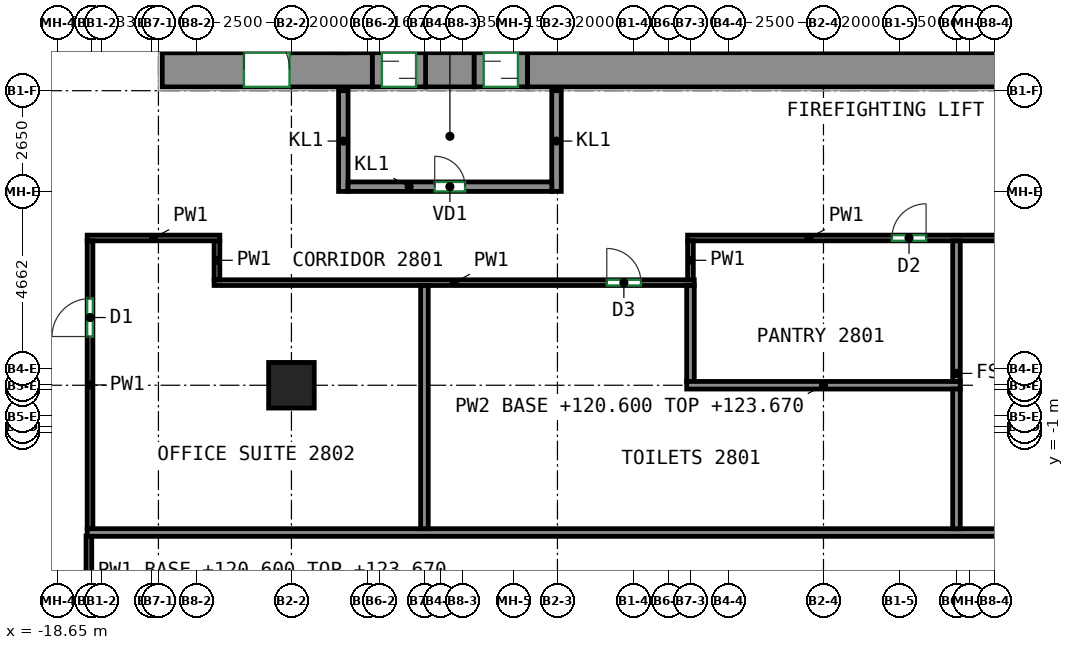
"""IFC4 building model, lengths in metres.
Left out: names, types, materials, properties, quantities, classifications, styles, units other than length and angle.
Written with IfcOpenShell. Run it as: python <this file> out.ifc"""

import sys

from ifc_helpers import new_model, si_unit, direction, frame, frame_2d, origin, origin_2d, place, context, subcontext, project, spatial, rectangle, extrude, source, transform, mapped, element, fill, save


model = new_model("IFC4")
c1 = context("Model", 3, precision=1e-05, world=origin(), true_north=direction((0.0, 1.0)))
c2 = subcontext(c1, "Body", "Model", "MODEL_VIEW")
j1 = project(units=[si_unit("LENGTHUNIT", "METRE"), si_unit("PLANEANGLEUNIT", "RADIAN")], contexts=[c1])
p1 = place(None, origin())
s1 = spatial("IfcSite", under=j1, at=p1, CompositionType="ELEMENT")
p2 = place(p1, origin())
s2 = spatial("IfcBuilding", under=s1, at=p2, CompositionType="ELEMENT")
p3 = place(p2, frame((0.0, 0.0, 120.6)))
s3 = spatial("IfcBuildingStorey", under=s2, at=p3, CompositionType="ELEMENT", Elevation=120.6)
m1 = source(origin(), c2, "Body", "SweptSolid", [
    extrude(rectangle(XDim=1.2, YDim=1.2, at=origin_2d()), origin(), (0.0, 0.0, 1.0), 3.72),
])
p4 = place(p3, frame((-12.5, 0.25, 0.0), z_axis=(0.0, 0.0, 1.0), x_axis=(1.0, 0.0, 0.0)))
e1 = element("IfcColumn", 1, at=p4, inside=s3, PredefinedType="COLUMN", context=c2, shape_type="MappedRepresentation", body=[
    mapped(m1, transform((0.0, 0.0, 0.0))),
])
m2 = source(origin(), c2, "Body", "SweptSolid", [
    extrude(rectangle(XDim=5.53, YDim=0.9, at=frame_2d((2.765, 0.0))), origin(), (0.0, 0.0, 1.0), 3.72),
])
p5 = place(p3, frame((-15.9, 8.55, 0.0), z_axis=(0.0, 0.0, 1.0), x_axis=(1.0, 0.0, 0.0)))
e2 = element("IfcWall", 2, at=p5, inside=s3, PredefinedType="SHEAR", context=c2, shape_type="MappedRepresentation", body=[
    mapped(m2, transform((0.0, 0.0, 0.0))),
])
p6 = place(p5, frame((2.15, 0.0, 0.0)))
e3 = element("IfcOpeningElement", 3, at=p6, cuts=e2, PredefinedType="OPENING", context=c2, shape_type="SweptSolid", body=[
    extrude(rectangle(XDim=1.2, YDim=2.1, at=frame_2d((0.6, 1.05))), frame((0.0, 0.46, 0.0), z_axis=(0.0, -1.0, 0.0), x_axis=(1.0, 0.0, 0.0)), (0.0, 0.0, 1.0), 0.92),
])
m3 = source(origin(), c2, "Body", "SweptSolid", [
    extrude(rectangle(XDim=1.28, YDim=0.9, at=frame_2d((0.64, 0.0))), origin(), (0.0, 0.0, 1.0), 3.72),
])
p7 = place(p3, frame((-8.97, 8.55, 0.0), z_axis=(0.0, 0.0, 1.0), x_axis=(1.0, 0.0, 0.0)))
e4 = element("IfcWall", 4, at=p7, inside=s3, PredefinedType="SHEAR", context=c2, shape_type="MappedRepresentation", body=[
    mapped(m3, transform((0.0, 0.0, 0.0))),
])
m4 = source(origin(), c2, "Body", "SweptSolid", [
    extrude(rectangle(XDim=14.18, YDim=0.9, at=frame_2d((7.09, 0.0))), origin(), (0.0, 0.0, 1.0), 3.72),
])
p8 = place(p3, frame((-6.29, 8.55, 0.0), z_axis=(0.0, 0.0, 1.0), x_axis=(1.0, 0.0, 0.0)))
e5 = element("IfcWall", 5, at=p8, inside=s3, PredefinedType="SHEAR", context=c2, shape_type="MappedRepresentation", body=[
    mapped(m4, transform((0.0, 0.0, 0.0))),
])
m5 = source(origin(), c2, "Body", "SweptSolid", [
    extrude(rectangle(XDim=2.65, YDim=0.25, at=frame_2d((1.325, 0.0))), origin(), (0.0, 0.0, 1.0), 3.72),
])
for number, where, z_axis, x_axis in (
    (6, (-11.135, 5.35, 0.0), (0.0, 0.0, 1.0), (0.0, 1.0, 0.0)),
    (7, (-5.525, 5.35, 0.0), (0.0, 0.0, 1.0), (0.0, 1.0, 0.0)),
):
    element("IfcWall", number, at=place(p3, frame(where, z_axis=z_axis, x_axis=x_axis)), inside=s3, PredefinedType="PARTITIONING", context=c2, shape_type="MappedRepresentation", body=[
        mapped(m5, transform((0.0, 0.0, 0.0))),
    ])
m6 = source(origin(), c2, "Body", "SweptSolid", [
    extrude(rectangle(XDim=5.36, YDim=0.25, at=frame_2d((2.68, 0.0))), origin(), (0.0, 0.0, 1.0), 3.72),
])
p9 = place(p3, frame((-11.01, 5.475, 0.0), z_axis=(0.0, 0.0, 1.0), x_axis=(1.0, 0.0, 0.0)))
e8 = element("IfcWall", 8, at=p9, inside=s3, PredefinedType="PARTITIONING", context=c2, shape_type="MappedRepresentation", body=[
    mapped(m6, transform((0.0, 0.0, 0.0))),
])
p10 = place(p9, frame((2.28, 0.0, 0.0)))
e9 = element("IfcOpeningElement", 9, at=p10, cuts=e8, PredefinedType="OPENING", context=c2, shape_type="SweptSolid", body=[
    extrude(rectangle(XDim=0.8, YDim=2.0, at=frame_2d((0.4, 1.0))), frame((0.0, 0.135, 0.0), z_axis=(0.0, -1.0, 0.0), x_axis=(1.0, 0.0, 0.0)), (0.0, 0.0, 1.0), 0.27),
])
m7 = source(origin(), c2, "Body", "SweptSolid", [
    extrude(rectangle(XDim=1.4, YDim=0.9, at=frame_2d((0.7, 0.0))), origin(), (0.0, 0.0, 1.0), 2.7),
])
p11 = place(p3, frame((-10.37, 8.55, 0.0), z_axis=(0.0, 0.0, 1.0), x_axis=(1.0, 0.0, 0.0)))
e10 = element("IfcWall", 10, at=p11, inside=s3, PredefinedType="PARTITIONING", context=c2, shape_type="MappedRepresentation", body=[
    mapped(m7, transform((0.0, 0.0, 0.0))),
])
p12 = place(p11, frame((0.25, 0.0, 0.0)))
e11 = element("IfcOpeningElement", 11, at=p12, cuts=e10, PredefinedType="OPENING", context=c2, shape_type="SweptSolid", body=[
    extrude(rectangle(XDim=0.9, YDim=2.1, at=frame_2d((0.45, 1.05))), frame((0.0, 0.46, 0.0), z_axis=(0.0, -1.0, 0.0), x_axis=(1.0, 0.0, 0.0)), (0.0, 0.0, 1.0), 0.92),
])
m8 = source(origin(), c2, "Body", "SweptSolid", [
    extrude(rectangle(XDim=1.4, YDim=0.9, at=frame_2d((0.7, 0.0))), origin(), (0.0, 0.0, 1.0), 2.7),
])
p13 = place(p3, frame((-7.69, 8.55, 0.0), z_axis=(0.0, 0.0, 1.0), x_axis=(1.0, 0.0, 0.0)))
e12 = element("IfcWall", 12, at=p13, inside=s3, PredefinedType="PARTITIONING", context=c2, shape_type="MappedRepresentation", body=[
    mapped(m8, transform((0.0, 0.0, 0.0))),
])
p14 = place(p13, frame((0.25, 0.0, 0.0)))
e13 = element("IfcOpeningElement", 13, at=p14, cuts=e12, PredefinedType="OPENING", context=c2, shape_type="SweptSolid", body=[
    extrude(rectangle(XDim=0.9, YDim=2.1, at=frame_2d((0.45, 1.05))), frame((0.0, 0.46, 0.0), z_axis=(0.0, -1.0, 0.0), x_axis=(1.0, 0.0, 0.0)), (0.0, 0.0, 1.0), 0.92),
])
p15 = place(p3, frame((-14.535, 2.95, 0.0), z_axis=(0.0, 0.0, 1.0), x_axis=(1.0, 0.0, 0.0)))
e14 = element("IfcWall", 14, at=p15, inside=s3, PredefinedType="PARTITIONING", context=c2, shape_type="SweptSolid", body=[
    extrude(rectangle(XDim=12.635, YDim=0.15, at=frame_2d((6.317, 0.0))), origin(), (0.0, 0.0, 1.0), 3.72),
])
p16 = place(p15, frame((10.333, 0.0, 0.0)))
e15 = element("IfcOpeningElement", 15, at=p16, cuts=e14, PredefinedType="OPENING", context=c2, shape_type="SweptSolid", body=[
    extrude(rectangle(XDim=0.9, YDim=2.1, at=frame_2d((0.45, 1.05))), frame((0.0, 0.085, 0.0), z_axis=(0.0, -1.0, 0.0), x_axis=(1.0, 0.0, 0.0)), (0.0, 0.0, 1.0), 0.17),
])
p17 = place(p3, frame((-14.46, 4.05, 0.0), z_axis=(0.0, 0.0, 1.0), x_axis=(0.0, -1.0, 0.0)))
e16 = element("IfcWall", 16, at=p17, inside=s3, PredefinedType="PARTITIONING", context=c2, shape_type="SweptSolid", body=[
    extrude(rectangle(XDim=1.025, YDim=0.15, at=frame_2d((0.513, 0.0))), origin(), (0.0, 0.0, 1.0), 3.72),
])
p18 = place(p3, frame((-17.875, 4.125, 0.0), z_axis=(0.0, 0.0, 1.0), x_axis=(1.0, 0.0, 0.0)))
e17 = element("IfcWall", 17, at=p18, inside=s3, PredefinedType="PARTITIONING", context=c2, shape_type="SweptSolid", body=[
    extrude(rectangle(XDim=3.49, YDim=0.15, at=frame_2d((1.745, 0.0))), origin(), (0.0, 0.0, 1.0), 3.72),
])
p19 = place(p3, frame((-17.8, -3.535, 0.0), z_axis=(0.0, 0.0, 1.0), x_axis=(0.0, 1.0, 0.0)))
e18 = element("IfcWall", 18, at=p19, inside=s3, PredefinedType="PARTITIONING", context=c2, shape_type="SweptSolid", body=[
    extrude(rectangle(XDim=7.585, YDim=0.15, at=frame_2d((3.792, 0.0))), origin(), (0.0, 0.0, 1.0), 3.72),
])
p20 = place(p19, frame((5.067, 0.0, 0.0)))
e19 = element("IfcOpeningElement", 19, at=p20, cuts=e18, PredefinedType="OPENING", context=c2, shape_type="SweptSolid", body=[
    extrude(rectangle(XDim=1.0, YDim=2.1, at=frame_2d((0.5, 1.05))), frame((0.0, 0.085, 0.0), z_axis=(0.0, -1.0, 0.0), x_axis=(1.0, 0.0, 0.0)), (0.0, 0.0, 1.0), 0.17),
])
p21 = place(p3, frame((-17.83, -15.675, 0.0), z_axis=(0.0, 0.0, 1.0), x_axis=(0.0, 1.0, 0.0)))
e20 = element("IfcWall", 20, at=p21, inside=s3, PredefinedType="PARTITIONING", context=c2, shape_type="SweptSolid", body=[
    extrude(rectangle(XDim=11.96, YDim=0.15, at=frame_2d((5.98, 0.0))), origin(), (0.0, 0.0, 1.0), 3.72),
])
p22 = place(p21, frame((8.249, 0.0, 0.0)))
e21 = element("IfcOpeningElement", 21, at=p22, cuts=e20, PredefinedType="OPENING", context=c2, shape_type="SweptSolid", body=[
    extrude(rectangle(XDim=1.8, YDim=2.1, at=frame_2d((0.9, 1.05))), frame((0.0, 0.085, 0.0), z_axis=(0.0, -1.0, 0.0), x_axis=(1.0, 0.0, 0.0)), (0.0, 0.0, 1.0), 0.17),
])
p23 = place(p3, frame((-2.075, 4.125, 0.0), z_axis=(0.0, 0.0, 1.0), x_axis=(1.0, 0.0, 0.0)))
e22 = element("IfcWall", 22, at=p23, inside=s3, PredefinedType="PARTITIONING", context=c2, shape_type="SweptSolid", body=[
    extrude(rectangle(XDim=10.65, YDim=0.15, at=frame_2d((5.325, 0.0))), origin(), (0.0, 0.0, 1.0), 3.72),
])
p24 = place(p23, frame((5.376, 0.0, 0.0)))
e23 = element("IfcOpeningElement", 23, at=p24, cuts=e22, PredefinedType="OPENING", context=c2, shape_type="SweptSolid", body=[
    extrude(rectangle(XDim=0.9, YDim=2.1, at=frame_2d((0.45, 1.05))), frame((0.0, 0.085, 0.0), z_axis=(0.0, -1.0, 0.0), x_axis=(1.0, 0.0, 0.0)), (0.0, 0.0, 1.0), 0.17),
])
p25 = place(p3, frame((-2.0, 3.025, 0.0), z_axis=(0.0, 0.0, 1.0), x_axis=(0.0, 1.0, 0.0)))
e24 = element("IfcWall", 24, at=p25, inside=s3, PredefinedType="PARTITIONING", context=c2, shape_type="SweptSolid", body=[
    extrude(rectangle(XDim=1.025, YDim=0.15, at=frame_2d((0.513, 0.0))), origin(), (0.0, 0.0, 1.0), 3.72),
])
p26 = place(p3, frame((-17.874, -3.625, 0.0), z_axis=(0.0, 0.0, 1.0), x_axis=(1.0, 0.0, 0.0)))
e25 = element("IfcWall", 25, at=p26, inside=s3, PredefinedType="PARTITIONING", context=c2, shape_type="SweptSolid", body=[
    extrude(rectangle(XDim=33.474, YDim=0.2, at=frame_2d((16.737, 0.0))), origin(), (0.0, 0.0, 1.0), 3.72),
])
p27 = place(p3, frame((-9.0, -3.525, 0.0), z_axis=(0.0, 0.0, 1.0), x_axis=(0.0, 1.0, 0.0)))
e26 = element("IfcWall", 26, at=p27, inside=s3, PredefinedType="PARTITIONING", context=c2, shape_type="SweptSolid", body=[
    extrude(rectangle(XDim=6.399, YDim=0.2, at=frame_2d((3.199, 0.0))), origin(), (0.0, 0.0, 1.0), 3.72),
])
p28 = place(p3, frame((-2.0, 0.35, 0.0), z_axis=(0.0, 0.0, 1.0), x_axis=(0.0, 1.0, 0.0)))
e27 = element("IfcWall", 27, at=p28, inside=s3, PredefinedType="PARTITIONING", context=c2, shape_type="SweptSolid", body=[
    extrude(rectangle(XDim=2.524, YDim=0.2, at=frame_2d((1.262, 0.0))), origin(), (0.0, 0.0, 1.0), 3.72),
])
p29 = place(p3, frame((-2.1, 0.25, 0.0), z_axis=(0.0, 0.0, 1.0), x_axis=(1.0, 0.0, 0.0)))
e28 = element("IfcWall", 28, at=p29, inside=s3, PredefinedType="PARTITIONING", context=c2, shape_type="SweptSolid", body=[
    extrude(rectangle(XDim=7.2, YDim=0.2, at=frame_2d((3.6, 0.0))), origin(), (0.0, 0.0, 1.0), 3.07),
])
p30 = place(p3, frame((5.0, -3.525, 0.0), z_axis=(0.0, 0.0, 1.0), x_axis=(0.0, 1.0, 0.0)))
e29 = element("IfcWall", 29, at=p30, inside=s3, PredefinedType="PARTITIONING", context=c2, shape_type="SweptSolid", body=[
    extrude(rectangle(XDim=3.675, YDim=0.2, at=frame_2d((1.837, 0.0))), origin(), (0.0, 0.0, 1.0), 3.72),
])
p31 = place(p3, frame((5.0, 0.35, 0.0), z_axis=(0.0, 0.0, 1.0), x_axis=(0.0, 1.0, 0.0)))
e30 = element("IfcWall", 30, at=p31, inside=s3, PredefinedType="PARTITIONING", context=c2, shape_type="SweptSolid", body=[
    extrude(rectangle(XDim=3.699, YDim=0.2, at=frame_2d((1.85, 0.0))), origin(), (0.0, 0.0, 1.0), 3.72),
])
p32 = place(p10, origin())
e31 = element("IfcDoor", 31, at=p32, inside=s3, OperationType="SINGLE_SWING_LEFT", PredefinedType="DOOR", context=c2, shape_type="SweptSolid", body=[
    extrude(rectangle(XDim=0.8, YDim=2.0, at=frame_2d((0.4, 1.0))), frame((0.0, 0.025, 0.0), z_axis=(0.0, -1.0, 0.0), x_axis=(1.0, 0.0, 0.0)), (0.0, 0.0, 1.0), 0.05),
])
fill(e9, e31)
p33 = place(p12, origin())
e32 = element("IfcDoor", 32, at=p33, inside=s3, OperationType="SLIDING_TO_LEFT", PredefinedType="DOOR", context=c2, shape_type="SweptSolid", body=[
    extrude(rectangle(XDim=0.9, YDim=2.1, at=frame_2d((0.45, 1.05))), frame((0.0, 0.355, 0.0), z_axis=(0.0, -1.0, 0.0), x_axis=(1.0, 0.0, 0.0)), (0.0, 0.0, 1.0), 0.05),
])
fill(e11, e32)
p34 = place(p14, origin())
e33 = element("IfcDoor", 33, at=p34, inside=s3, OperationType="SLIDING_TO_RIGHT", PredefinedType="DOOR", context=c2, shape_type="SweptSolid", body=[
    extrude(rectangle(XDim=0.9, YDim=2.1, at=frame_2d((0.45, 1.05))), frame((0.0, 0.355, 0.0), z_axis=(0.0, -1.0, 0.0), x_axis=(1.0, 0.0, 0.0)), (0.0, 0.0, 1.0), 0.05),
])
fill(e13, e33)
p35 = place(p6, origin())
e34 = element("IfcDoor", 34, at=p35, inside=s3, OperationType="DOUBLE_DOOR_SINGLE_SWING", PredefinedType="DOOR", context=c2, shape_type="SweptSolid", body=[
    extrude(rectangle(XDim=1.2, YDim=2.1, at=frame_2d((0.6, 1.05))), frame((0.0, 0.355, 0.0), z_axis=(0.0, -1.0, 0.0), x_axis=(1.0, 0.0, 0.0)), (0.0, 0.0, 1.0), 0.05),
])
fill(e3, e34)
p36 = place(p20, origin())
e35 = element("IfcDoor", 35, at=p36, inside=s3, OperationType="SINGLE_SWING_LEFT", PredefinedType="DOOR", context=c2, shape_type="SweptSolid", body=[
    extrude(rectangle(XDim=1.0, YDim=2.1, at=frame_2d((0.5, 1.05))), frame((0.0, 0.025, 0.0), z_axis=(0.0, -1.0, 0.0), x_axis=(1.0, 0.0, 0.0)), (0.0, 0.0, 1.0), 0.05),
])
fill(e19, e35)
p37 = place(p16, origin())
e36 = element("IfcDoor", 36, at=p37, inside=s3, OperationType="SINGLE_SWING_LEFT", PredefinedType="DOOR", context=c2, shape_type="SweptSolid", body=[
    extrude(rectangle(XDim=0.9, YDim=2.1, at=frame_2d((0.45, 1.05))), frame((0.0, 0.025, 0.0), z_axis=(0.0, -1.0, 0.0), x_axis=(1.0, 0.0, 0.0)), (0.0, 0.0, 1.0), 0.05),
])
fill(e15, e36)
p38 = place(p24, origin())
e37 = element("IfcDoor", 37, at=p38, inside=s3, OperationType="SINGLE_SWING_RIGHT", PredefinedType="DOOR", context=c2, shape_type="SweptSolid", body=[
    extrude(rectangle(XDim=0.9, YDim=2.1, at=frame_2d((0.45, 1.05))), frame((0.0, 0.025, 0.0), z_axis=(0.0, -1.0, 0.0), x_axis=(1.0, 0.0, 0.0)), (0.0, 0.0, 1.0), 0.05),
])
fill(e23, e37)
save(model, sys.argv[1])
